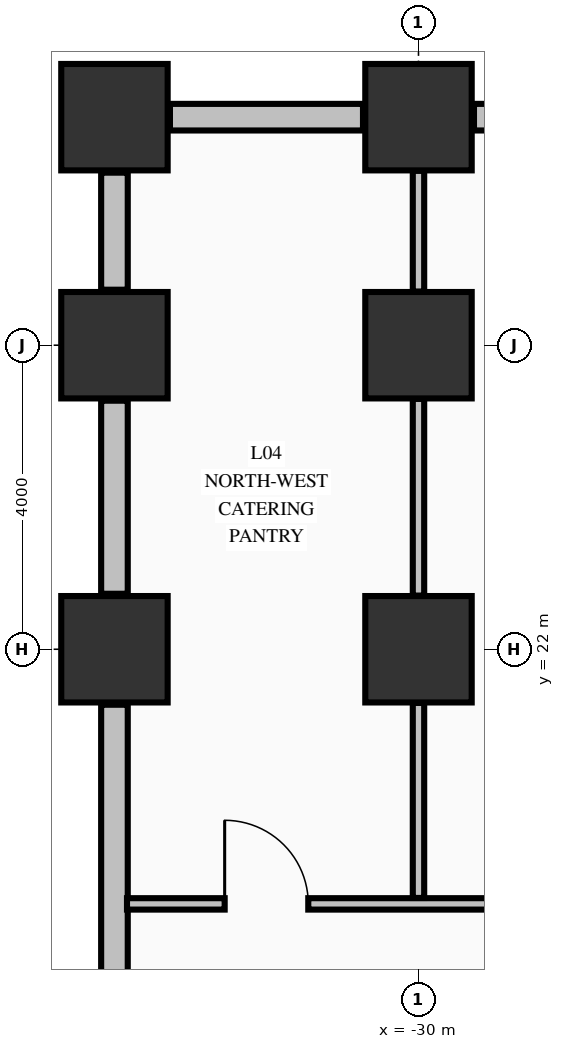
"""IFC4 building model, lengths in metres.
Left out: names, types, materials, properties, quantities, classifications, styles, units other than length and angle.
Written with IfcOpenShell. Run it as: python <this file> out.ifc"""

import sys

from ifc_helpers import new_model, si_unit, direction, frame, frame_2d, origin, origin_2d, place, context, subcontext, project, spatial, rectangle, extrude, element, fill, save


model = new_model("IFC4")
c1 = context("Model", 3, precision=1e-05, world=origin(), true_north=direction((0.0, 1.0)))
c2 = subcontext(c1, "Body", "Model", "MODEL_VIEW")
j1 = project(units=[si_unit("LENGTHUNIT", "METRE"), si_unit("PLANEANGLEUNIT", "RADIAN")], contexts=[c1])
p1 = place(None, origin())
s1 = spatial("IfcSite", under=j1, at=p1, CompositionType="ELEMENT")
p2 = place(p1, origin())
s2 = spatial("IfcBuilding", under=s1, at=p2, CompositionType="ELEMENT")
p3 = place(p2, frame((0.0, 0.0, 21.76)))
s3 = spatial("IfcBuildingStorey", under=s2, at=p3, CompositionType="ELEMENT", Elevation=21.76)
for number, where, z_axis, x_axis in (
    (1, (-34.0, 22.0, -0.45), (0.0, 0.0, 1.0), (1.0, 0.0, 0.0)),
    (2, (-34.0, 26.0, -0.45), (0.0, 0.0, 1.0), (1.0, 0.0, 0.0)),
    (3, (-34.0, 29.0, -0.45), (0.0, 0.0, 1.0), (1.0, 0.0, 0.0)),
    (4, (-30.0, 22.0, -0.45), (0.0, 0.0, 1.0), (1.0, 0.0, 0.0)),
    (5, (-30.0, 26.0, -0.45), (0.0, 0.0, 1.0), (1.0, 0.0, 0.0)),
    (6, (-30.0, 29.0, -0.45), (0.0, 0.0, 1.0), (1.0, 0.0, 0.0)),
):
    element("IfcColumn", number, at=place(p3, frame(where, z_axis=z_axis, x_axis=x_axis)), inside=s3, PredefinedType="COLUMN", context=c2, shape_type="SweptSolid", body=[
        extrude(rectangle(XDim=1.4, YDim=1.4, at=origin_2d()), origin(), (0.0, 0.0, 1.0), 5.44),
    ])
for number, where, z_axis, x_axis in (
    (7, (-30.73, 29.0, 0.0), (0.0, 0.0, 1.0), (-1.0, 0.0, 0.0)),
    (8, (-26.73, 29.0, 0.0), (0.0, 0.0, 1.0), (-1.0, 0.0, 0.0)),
):
    element("IfcWall", number, at=place(p3, frame(where, z_axis=z_axis, x_axis=x_axis)), inside=s3, PredefinedType="STANDARD", context=c2, shape_type="SweptSolid", body=[
        extrude(rectangle(XDim=2.54, YDim=0.35, at=frame_2d((1.27, 0.0))), origin(), (0.0, 0.0, 1.0), 3.332),
    ])
p4 = place(p3, frame((-34.0, 16.73, 0.0), z_axis=(0.0, 0.0, 1.0), x_axis=(0.0, 1.0, 0.0)))
e9 = element("IfcWall", 9, at=p4, inside=s3, PredefinedType="STANDARD", context=c2, shape_type="SweptSolid", body=[
    extrude(rectangle(XDim=4.54, YDim=0.35, at=frame_2d((2.27, 0.0))), origin(), (0.0, 0.0, 1.0), 3.332),
])
p5 = place(p3, frame((-34.0, 22.73, 0.0), z_axis=(0.0, 0.0, 1.0), x_axis=(0.0, 1.0, 0.0)))
e10 = element("IfcWall", 10, at=p5, inside=s3, PredefinedType="STANDARD", context=c2, shape_type="SweptSolid", body=[
    extrude(rectangle(XDim=2.54, YDim=0.35, at=frame_2d((1.27, 0.0))), origin(), (0.0, 0.0, 1.0), 3.332),
])
p6 = place(p3, frame((-34.0, 26.73, 0.0), z_axis=(0.0, 0.0, 1.0), x_axis=(0.0, 1.0, 0.0)))
e11 = element("IfcWall", 11, at=p6, inside=s3, PredefinedType="STANDARD", context=c2, shape_type="SweptSolid", body=[
    extrude(rectangle(XDim=1.54, YDim=0.35, at=frame_2d((0.77, 0.0))), origin(), (0.0, 0.0, 1.0), 3.332),
])
p7 = place(p3, frame((-33.835, 18.65, 0.0), z_axis=(0.0, 0.0, 1.0), x_axis=(1.0, 0.0, 0.0)))
e12 = element("IfcWall", 12, at=p7, inside=s3, PredefinedType="PARTITIONING", context=c2, shape_type="SweptSolid", body=[
    extrude(rectangle(XDim=63.685, YDim=0.15, at=frame_2d((31.843, 0.0))), origin(), (0.0, 0.0, 1.0), 4.99),
])
p8 = place(p7, frame((27.81, 0.0, 0.0)))
e13 = element("IfcOpeningElement", 13, at=p8, cuts=e12, PredefinedType="OPENING", context=c2, shape_type="SweptSolid", body=[
    extrude(rectangle(XDim=1.05, YDim=2.15, at=frame_2d((0.525, 1.075))), frame((0.0, 0.085, 0.0), z_axis=(0.0, -1.0, 0.0), x_axis=(1.0, 0.0, 0.0)), (0.0, 0.0, 1.0), 0.17),
])
p9 = place(p7, frame((24.46, 0.0, 0.0)))
e14 = element("IfcOpeningElement", 14, at=p9, cuts=e12, PredefinedType="OPENING", context=c2, shape_type="SweptSolid", body=[
    extrude(rectangle(XDim=1.05, YDim=2.15, at=frame_2d((0.525, 1.075))), frame((0.0, 0.085, 0.0), z_axis=(0.0, -1.0, 0.0), x_axis=(1.0, 0.0, 0.0)), (0.0, 0.0, 1.0), 0.17),
])
p10 = place(p7, frame((31.16, 0.0, 0.0)))
e15 = element("IfcOpeningElement", 15, at=p10, cuts=e12, PredefinedType="OPENING", context=c2, shape_type="SweptSolid", body=[
    extrude(rectangle(XDim=1.05, YDim=2.15, at=frame_2d((0.525, 1.075))), frame((0.0, 0.085, 0.0), z_axis=(0.0, -1.0, 0.0), x_axis=(1.0, 0.0, 0.0)), (0.0, 0.0, 1.0), 0.17),
])
p11 = place(p7, frame((38.785, 0.0, 0.0)))
e16 = element("IfcOpeningElement", 16, at=p11, cuts=e12, PredefinedType="OPENING", context=c2, shape_type="SweptSolid", body=[
    extrude(rectangle(XDim=1.1, YDim=2.15, at=frame_2d((0.55, 1.075))), frame((0.0, 0.085, 0.0), z_axis=(0.0, -1.0, 0.0), x_axis=(1.0, 0.0, 0.0)), (0.0, 0.0, 1.0), 0.17),
])
p12 = place(p7, frame((1.285, 0.0, 0.0)))
e17 = element("IfcOpeningElement", 17, at=p12, cuts=e12, PredefinedType="OPENING", context=c2, shape_type="SweptSolid", body=[
    extrude(rectangle(XDim=1.1, YDim=2.15, at=frame_2d((0.55, 1.075))), frame((0.0, 0.085, 0.0), z_axis=(0.0, -1.0, 0.0), x_axis=(1.0, 0.0, 0.0)), (0.0, 0.0, 1.0), 0.17),
])
p13 = place(p7, frame((5.36, 0.0, 0.0)))
e18 = element("IfcOpeningElement", 18, at=p13, cuts=e12, PredefinedType="OPENING", context=c2, shape_type="SweptSolid", body=[
    extrude(rectangle(XDim=0.95, YDim=2.15, at=frame_2d((0.475, 1.075))), frame((0.0, 0.085, 0.0), z_axis=(0.0, -1.0, 0.0), x_axis=(1.0, 0.0, 0.0)), (0.0, 0.0, 1.0), 0.17),
])
p14 = place(p7, frame((10.285, 0.0, 0.0)))
e19 = element("IfcOpeningElement", 19, at=p14, cuts=e12, PredefinedType="OPENING", context=c2, shape_type="SweptSolid", body=[
    extrude(rectangle(XDim=1.1, YDim=2.15, at=frame_2d((0.55, 1.075))), frame((0.0, 0.085, 0.0), z_axis=(0.0, -1.0, 0.0), x_axis=(1.0, 0.0, 0.0)), (0.0, 0.0, 1.0), 0.17),
])
p15 = place(p7, frame((17.785, 0.0, 0.0)))
e20 = element("IfcOpeningElement", 20, at=p15, cuts=e12, PredefinedType="OPENING", context=c2, shape_type="SweptSolid", body=[
    extrude(rectangle(XDim=1.1, YDim=2.15, at=frame_2d((0.55, 1.075))), frame((0.0, 0.085, 0.0), z_axis=(0.0, -1.0, 0.0), x_axis=(1.0, 0.0, 0.0)), (0.0, 0.0, 1.0), 0.17),
])
p16 = place(p7, frame((61.215, 0.0, 0.0)))
e21 = element("IfcOpeningElement", 21, at=p16, cuts=e12, PredefinedType="OPENING", context=c2, shape_type="SweptSolid", body=[
    extrude(rectangle(XDim=1.1, YDim=2.15, at=frame_2d((0.55, 1.075))), frame((0.0, 0.085, 0.0), z_axis=(0.0, -1.0, 0.0), x_axis=(1.0, 0.0, 0.0)), (0.0, 0.0, 1.0), 0.17),
])
p17 = place(p7, frame((47.56, 0.0, 0.0)))
e22 = element("IfcOpeningElement", 22, at=p17, cuts=e12, PredefinedType="OPENING", context=c2, shape_type="SweptSolid", body=[
    extrude(rectangle(XDim=0.95, YDim=2.15, at=frame_2d((0.475, 1.075))), frame((0.0, 0.085, 0.0), z_axis=(0.0, -1.0, 0.0), x_axis=(1.0, 0.0, 0.0)), (0.0, 0.0, 1.0), 0.17),
])
p18 = place(p7, frame((51.31, 0.0, 0.0)))
e23 = element("IfcOpeningElement", 23, at=p18, cuts=e12, PredefinedType="OPENING", context=c2, shape_type="SweptSolid", body=[
    extrude(rectangle(XDim=1.05, YDim=2.15, at=frame_2d((0.525, 1.075))), frame((0.0, 0.085, 0.0), z_axis=(0.0, -1.0, 0.0), x_axis=(1.0, 0.0, 0.0)), (0.0, 0.0, 1.0), 0.17),
])
p19 = place(p7, frame((56.06, 0.0, 0.0)))
e24 = element("IfcOpeningElement", 24, at=p19, cuts=e12, PredefinedType="OPENING", context=c2, shape_type="SweptSolid", body=[
    extrude(rectangle(XDim=0.95, YDim=2.15, at=frame_2d((0.475, 1.075))), frame((0.0, 0.085, 0.0), z_axis=(0.0, -1.0, 0.0), x_axis=(1.0, 0.0, 0.0)), (0.0, 0.0, 1.0), 0.17),
])
p20 = place(p7, frame((58.535, 0.0, 0.0)))
e25 = element("IfcOpeningElement", 25, at=p20, cuts=e12, PredefinedType="OPENING", context=c2, shape_type="SweptSolid", body=[
    extrude(rectangle(XDim=0.9, YDim=2.15, at=frame_2d((0.45, 1.075))), frame((0.0, 0.085, 0.0), z_axis=(0.0, -1.0, 0.0), x_axis=(1.0, 0.0, 0.0)), (0.0, 0.0, 1.0), 0.17),
])
p21 = place(p3, frame((-30.0, 18.728, 0.0), z_axis=(0.0, 0.0, 1.0), x_axis=(0.0, 1.0, 0.0)))
e26 = element("IfcWall", 26, at=p21, inside=s3, PredefinedType="PARTITIONING", context=c2, shape_type="SweptSolid", body=[
    extrude(rectangle(XDim=2.566, YDim=0.15, at=frame_2d((1.283, 0.0))), origin(), (0.0, 0.0, 1.0), 3.332),
])
p22 = place(p3, frame((-30.0, 22.706, 0.0), z_axis=(0.0, 0.0, 1.0), x_axis=(0.0, 1.0, 0.0)))
e27 = element("IfcWall", 27, at=p22, inside=s3, PredefinedType="PARTITIONING", context=c2, shape_type="SweptSolid", body=[
    extrude(rectangle(XDim=2.588, YDim=0.15, at=frame_2d((1.294, 0.0))), origin(), (0.0, 0.0, 1.0), 3.332),
])
p23 = place(p3, frame((-30.0, 26.706, 0.0), z_axis=(0.0, 0.0, 1.0), x_axis=(0.0, 1.0, 0.0)))
e28 = element("IfcWall", 28, at=p23, inside=s3, PredefinedType="PARTITIONING", context=c2, shape_type="SweptSolid", body=[
    extrude(rectangle(XDim=1.588, YDim=0.15, at=frame_2d((0.794, 0.0))), origin(), (0.0, 0.0, 1.0), 3.332),
])
p24 = place(p12, origin())
e29 = element("IfcDoor", 29, at=p24, inside=s3, OperationType="SINGLE_SWING_LEFT", PredefinedType="DOOR", context=c2, shape_type="SweptSolid", body=[
    extrude(rectangle(XDim=1.1, YDim=2.15, at=frame_2d((0.55, 1.075))), frame((0.0, 0.025, 0.0), z_axis=(0.0, -1.0, 0.0), x_axis=(1.0, 0.0, 0.0)), (0.0, 0.0, 1.0), 0.05),
])
fill(e17, e29)
save(model, sys.argv[1])
